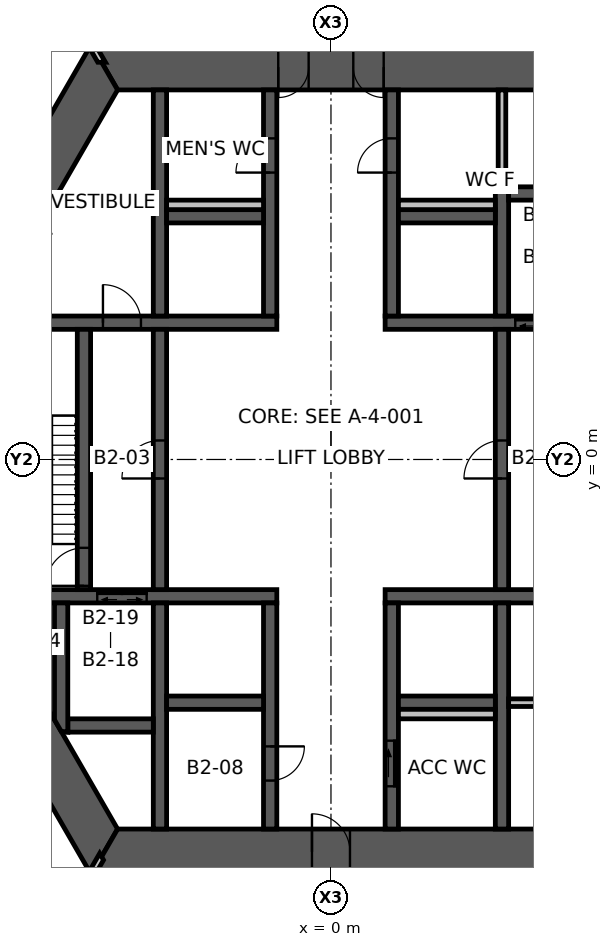
"""IFC4 building model, lengths in metres.
Left out: names, types, materials, properties, quantities, classifications, styles, units other than length and angle.
Written with IfcOpenShell. Run it as: python <this file> out.ifc"""

import sys

from ifc_helpers import new_model, si_unit, direction, frame, frame_2d, origin, place, context, subcontext, project, spatial, polyline, rectangle, outline, extrude, element, fill, save


model = new_model("IFC4")
c1 = context("Model", 3, precision=1e-05, world=origin(), true_north=direction((0.0, 1.0)))
c2 = subcontext(c1, "Body", "Model", "MODEL_VIEW")
j1 = project(units=[si_unit("LENGTHUNIT", "METRE"), si_unit("PLANEANGLEUNIT", "RADIAN")], contexts=[c1])
p1 = place(None, origin())
s1 = spatial("IfcSite", under=j1, at=p1, CompositionType="ELEMENT")
p2 = place(p1, origin())
s2 = spatial("IfcBuilding", under=s1, at=p2, CompositionType="ELEMENT")
p3 = place(p2, frame((0.0, 0.0, -10.0)))
s3 = spatial("IfcBuildingStorey", under=s2, at=p3, CompositionType="ELEMENT", Elevation=-10.0)
p4 = place(p3, frame((5.961, 10.325, 0.0), z_axis=(0.0, 0.0, 1.0), x_axis=(-1.0, 0.0, 0.0)))
e1 = element("IfcWall", 1, at=p4, inside=s3, PredefinedType="SHEAR", context=c2, shape_type="SweptSolid", body=[
    extrude(outline(polyline([(-0.346, -0.6), (4.574, -0.6), (5.374, -0.6), (6.549, -0.6), (7.349, -0.6), (12.269, -0.6), (11.576, 0.6), (7.349, 0.6), (6.549, 0.6), (5.374, 0.6), (4.574, 0.6), (0.346, 0.6), (-0.346, -0.6)])), origin(), (0.0, 0.0, 1.0), 5.0),
])
p5 = place(p4, frame((6.549, 0.0, 0.0)))
e2 = element("IfcOpeningElement", 2, at=p5, cuts=e1, PredefinedType="OPENING", context=c2, shape_type="SweptSolid", body=[
    extrude(rectangle(XDim=0.8, YDim=2.1, at=frame_2d((0.4, 1.05))), frame((0.0, 0.61, 0.0), z_axis=(0.0, -1.0, 0.0), x_axis=(1.0, 0.0, 0.0)), (0.0, 0.0, 1.0), 1.22),
])
p6 = place(p4, frame((4.574, 0.0, 0.0)))
e3 = element("IfcOpeningElement", 3, at=p6, cuts=e1, PredefinedType="OPENING", context=c2, shape_type="SweptSolid", body=[
    extrude(rectangle(XDim=0.8, YDim=2.1, at=frame_2d((0.4, 1.05))), frame((0.0, 0.61, 0.0), z_axis=(0.0, -1.0, 0.0), x_axis=(1.0, 0.0, 0.0)), (0.0, 0.0, 1.0), 1.22),
])
p7 = place(p3, frame((-5.961, 10.325, 0.0), z_axis=(0.0, 0.0, 1.0), x_axis=(-0.500004296715, -0.866022923061, 0.0)))
e4 = element("IfcWall", 4, at=p7, inside=s3, PredefinedType="SHEAR", context=c2, shape_type="SweptSolid", body=[
    extrude(outline(polyline([(-0.346, -0.6), (4.494, -0.6), (5.494, -0.6), (12.269, -0.6), (11.576, 0.6), (5.494, 0.6), (4.494, 0.6), (0.346, 0.6), (-0.346, -0.6)])), origin(), (0.0, 0.0, 1.0), 5.0),
])
p8 = place(p7, frame((4.494, 0.0, 0.0)))
e5 = element("IfcOpeningElement", 5, at=p8, cuts=e4, PredefinedType="OPENING", context=c2, shape_type="SweptSolid", body=[
    extrude(rectangle(XDim=1.0, YDim=2.1, at=frame_2d((0.5, 1.05))), frame((0.0, 0.61, 0.0), z_axis=(0.0, -1.0, 0.0), x_axis=(1.0, 0.0, 0.0)), (0.0, 0.0, 1.0), 1.22),
])
p9 = place(p3, frame((-11.922, 0.0, 0.0), z_axis=(0.0, 0.0, 1.0), x_axis=(0.500004296715, -0.866022923061, 0.0)))
e6 = element("IfcWall", 6, at=p9, inside=s3, PredefinedType="SHEAR", context=c2, shape_type="SweptSolid", body=[
    extrude(outline(polyline([(-0.346, -0.6), (6.581, -0.6), (7.381, -0.6), (12.269, -0.6), (11.576, 0.6), (7.381, 0.6), (6.581, 0.6), (0.346, 0.6), (-0.346, -0.6)])), origin(), (0.0, 0.0, 1.0), 5.0),
])
p10 = place(p9, frame((6.581, 0.0, 0.0)))
e7 = element("IfcOpeningElement", 7, at=p10, cuts=e6, PredefinedType="OPENING", context=c2, shape_type="SweptSolid", body=[
    extrude(rectangle(XDim=0.8, YDim=2.1, at=frame_2d((0.4, 1.05))), frame((0.0, 0.61, 0.0), z_axis=(0.0, -1.0, 0.0), x_axis=(1.0, 0.0, 0.0)), (0.0, 0.0, 1.0), 1.22),
])
p11 = place(p3, frame((-5.961, -10.325, 0.0), z_axis=(0.0, 0.0, 1.0), x_axis=(1.0, 0.0, 0.0)))
e8 = element("IfcWall", 8, at=p11, inside=s3, PredefinedType="SHEAR", context=c2, shape_type="SweptSolid", body=[
    extrude(outline(polyline([(-0.346, -0.6), (5.461, -0.6), (6.461, -0.6), (12.269, -0.6), (11.576, 0.6), (6.461, 0.6), (5.461, 0.6), (0.346, 0.6), (-0.346, -0.6)])), origin(), (0.0, 0.0, 1.0), 5.0),
])
p12 = place(p11, frame((5.461, 0.0, 0.0)))
e9 = element("IfcOpeningElement", 9, at=p12, cuts=e8, PredefinedType="OPENING", context=c2, shape_type="SweptSolid", body=[
    extrude(rectangle(XDim=1.0, YDim=2.1, at=frame_2d((0.5, 1.05))), frame((0.0, 0.61, 0.0), z_axis=(0.0, -1.0, 0.0), x_axis=(1.0, 0.0, 0.0)), (0.0, 0.0, 1.0), 1.22),
])
p13 = place(p3, frame((-9.151, 3.6, 0.0), z_axis=(0.0, 0.0, 1.0), x_axis=(1.0, 0.0, 0.0)))
e10 = element("IfcWall", 10, at=p13, inside=s3, PredefinedType="SHEAR", context=c2, shape_type="SweptSolid", body=[
    extrude(outline(polyline([(-0.101, -0.175), (3.151, -0.175), (4.151, -0.175), (7.726, -0.175), (7.726, 0.175), (4.151, 0.175), (3.151, 0.175), (0.101, 0.175), (-0.101, -0.175)])), origin(), (0.0, 0.0, 1.0), 5.0),
])
p14 = place(p13, frame((3.151, 0.0, 0.0)))
e11 = element("IfcOpeningElement", 11, at=p14, cuts=e10, PredefinedType="OPENING", context=c2, shape_type="SweptSolid", body=[
    extrude(rectangle(XDim=1.0, YDim=2.1, at=frame_2d((0.5, 1.05))), frame((0.0, 0.185, 0.0), z_axis=(0.0, -1.0, 0.0), x_axis=(1.0, 0.0, 0.0)), (0.0, 0.0, 1.0), 0.37),
])
p15 = place(p3, frame((1.425, 3.6, 0.0), z_axis=(0.0, 0.0, 1.0), x_axis=(1.0, 0.0, 0.0)))
e12 = element("IfcWall", 12, at=p15, inside=s3, PredefinedType="SHEAR", context=c2, shape_type="SweptSolid", body=[
    extrude(outline(polyline([(0.0, -0.175), (3.425, -0.175), (4.725, -0.175), (7.827, -0.175), (7.625, 0.175), (4.725, 0.175), (3.425, 0.175), (0.0, 0.175), (0.0, -0.175)])), origin(), (0.0, 0.0, 1.0), 5.0),
])
p16 = place(p15, frame((3.425, 0.0, 0.0)))
e13 = element("IfcOpeningElement", 13, at=p16, cuts=e12, PredefinedType="OPENING", context=c2, shape_type="SweptSolid", body=[
    extrude(rectangle(XDim=1.3, YDim=2.1, at=frame_2d((0.65, 1.05))), frame((0.0, 0.185, 0.0), z_axis=(0.0, -1.0, 0.0), x_axis=(1.0, 0.0, 0.0)), (0.0, 0.0, 1.0), 0.37),
])
p17 = place(p3, frame((-9.151, -3.6, 0.0), z_axis=(0.0, 0.0, 1.0), x_axis=(1.0, 0.0, 0.0)))
e14 = element("IfcWall", 14, at=p17, inside=s3, PredefinedType="SHEAR", context=c2, shape_type="SweptSolid", body=[
    extrude(outline(polyline([(0.101, -0.175), (3.001, -0.175), (4.301, -0.175), (7.726, -0.175), (7.726, 0.175), (4.301, 0.175), (3.001, 0.175), (-0.101, 0.175), (0.101, -0.175)])), origin(), (0.0, 0.0, 1.0), 5.0),
])
p18 = place(p17, frame((3.001, 0.0, 0.0)))
e15 = element("IfcOpeningElement", 15, at=p18, cuts=e14, PredefinedType="OPENING", context=c2, shape_type="SweptSolid", body=[
    extrude(rectangle(XDim=1.3, YDim=2.1, at=frame_2d((0.65, 1.05))), frame((0.0, 0.185, 0.0), z_axis=(0.0, -1.0, 0.0), x_axis=(1.0, 0.0, 0.0)), (0.0, 0.0, 1.0), 0.37),
])
p19 = place(p3, frame((1.425, -3.6, 0.0), z_axis=(0.0, 0.0, 1.0), x_axis=(1.0, 0.0, 0.0)))
e16 = element("IfcWall", 16, at=p19, inside=s3, PredefinedType="SHEAR", context=c2, shape_type="SweptSolid", body=[
    extrude(outline(polyline([(0.0, -0.175), (7.625, -0.175), (7.827, 0.175), (0.0, 0.175), (0.0, -0.175)])), origin(), (0.0, 0.0, 1.0), 5.0),
])
p20 = place(p3, frame((-1.6, 3.775, 0.0), z_axis=(0.0, 0.0, 1.0), x_axis=(0.0, 1.0, 0.0)))
e17 = element("IfcWall", 17, at=p20, inside=s3, PredefinedType="SHEAR", context=c2, shape_type="SweptSolid", body=[
    extrude(rectangle(XDim=5.95, YDim=0.35, at=frame_2d((2.975, 0.0))), origin(), (0.0, 0.0, 1.0), 5.0),
])
p21 = place(p20, frame((3.775, 0.0, 0.0)))
e18 = element("IfcOpeningElement", 18, at=p21, cuts=e17, PredefinedType="OPENING", context=c2, shape_type="SweptSolid", body=[
    extrude(rectangle(XDim=0.9, YDim=2.1, at=frame_2d((0.45, 1.05))), frame((0.0, 0.185, 0.0), z_axis=(0.0, -1.0, 0.0), x_axis=(1.0, 0.0, 0.0)), (0.0, 0.0, 1.0), 0.37),
])
p22 = place(p3, frame((1.6, 3.775, 0.0), z_axis=(0.0, 0.0, 1.0), x_axis=(0.0, 1.0, 0.0)))
e19 = element("IfcWall", 19, at=p22, inside=s3, PredefinedType="SHEAR", context=c2, shape_type="SweptSolid", body=[
    extrude(rectangle(XDim=5.95, YDim=0.35, at=frame_2d((2.975, 0.0))), origin(), (0.0, 0.0, 1.0), 5.0),
])
p23 = place(p22, frame((3.775, 0.0, 0.0)))
e20 = element("IfcOpeningElement", 20, at=p23, cuts=e19, PredefinedType="OPENING", context=c2, shape_type="SweptSolid", body=[
    extrude(rectangle(XDim=0.9, YDim=2.1, at=frame_2d((0.45, 1.05))), frame((0.0, 0.185, 0.0), z_axis=(0.0, -1.0, 0.0), x_axis=(1.0, 0.0, 0.0)), (0.0, 0.0, 1.0), 0.37),
])
p24 = place(p3, frame((-1.6, -3.775, 0.0), z_axis=(0.0, 0.0, 1.0), x_axis=(0.0, -1.0, 0.0)))
e21 = element("IfcWall", 21, at=p24, inside=s3, PredefinedType="SHEAR", context=c2, shape_type="SweptSolid", body=[
    extrude(rectangle(XDim=5.95, YDim=0.35, at=frame_2d((2.975, 0.0))), origin(), (0.0, 0.0, 1.0), 5.0),
])
p25 = place(p24, frame((3.775, 0.0, 0.0)))
e22 = element("IfcOpeningElement", 22, at=p25, cuts=e21, PredefinedType="OPENING", context=c2, shape_type="SweptSolid", body=[
    extrude(rectangle(XDim=0.9, YDim=2.1, at=frame_2d((0.45, 1.05))), frame((0.0, 0.185, 0.0), z_axis=(0.0, -1.0, 0.0), x_axis=(1.0, 0.0, 0.0)), (0.0, 0.0, 1.0), 0.37),
])
p26 = place(p3, frame((1.6, -3.775, 0.0), z_axis=(0.0, 0.0, 1.0), x_axis=(0.0, -1.0, 0.0)))
e23 = element("IfcWall", 23, at=p26, inside=s3, PredefinedType="SHEAR", context=c2, shape_type="SweptSolid", body=[
    extrude(rectangle(XDim=5.95, YDim=0.35, at=frame_2d((2.975, 0.0))), origin(), (0.0, 0.0, 1.0), 5.0),
])
p27 = place(p26, frame((3.625, 0.0, 0.0)))
e24 = element("IfcOpeningElement", 24, at=p27, cuts=e23, PredefinedType="OPENING", context=c2, shape_type="SweptSolid", body=[
    extrude(rectangle(XDim=1.2, YDim=2.1, at=frame_2d((0.6, 1.05))), frame((0.0, 0.185, 0.0), z_axis=(0.0, -1.0, 0.0), x_axis=(1.0, 0.0, 0.0)), (0.0, 0.0, 1.0), 0.37),
])
p28 = place(p3, frame((-4.5, -3.425, 0.0), z_axis=(0.0, 0.0, 1.0), x_axis=(0.0, 1.0, 0.0)))
e25 = element("IfcWall", 25, at=p28, inside=s3, PredefinedType="SHEAR", context=c2, shape_type="SweptSolid", body=[
    extrude(rectangle(XDim=6.85, YDim=0.35, at=frame_2d((3.425, 0.0))), origin(), (0.0, 0.0, 1.0), 5.0),
])
p29 = place(p28, frame((2.925, 0.0, 0.0)))
e26 = element("IfcOpeningElement", 26, at=p29, cuts=e25, PredefinedType="OPENING", context=c2, shape_type="SweptSolid", body=[
    extrude(rectangle(XDim=1.0, YDim=2.1, at=frame_2d((0.5, 1.05))), frame((0.0, 0.185, 0.0), z_axis=(0.0, -1.0, 0.0), x_axis=(1.0, 0.0, 0.0)), (0.0, 0.0, 1.0), 0.37),
])
p30 = place(p3, frame((4.5, -3.425, 0.0), z_axis=(0.0, 0.0, 1.0), x_axis=(0.0, 1.0, 0.0)))
e27 = element("IfcWall", 27, at=p30, inside=s3, PredefinedType="SHEAR", context=c2, shape_type="SweptSolid", body=[
    extrude(rectangle(XDim=6.85, YDim=0.35, at=frame_2d((3.425, 0.0))), origin(), (0.0, 0.0, 1.0), 5.0),
])
p31 = place(p30, frame((2.925, 0.0, 0.0)))
e28 = element("IfcOpeningElement", 28, at=p31, cuts=e27, PredefinedType="OPENING", context=c2, shape_type="SweptSolid", body=[
    extrude(rectangle(XDim=1.0, YDim=2.1, at=frame_2d((0.5, 1.05))), frame((0.0, 0.185, 0.0), z_axis=(0.0, -1.0, 0.0), x_axis=(1.0, 0.0, 0.0)), (0.0, 0.0, 1.0), 0.37),
])
p32 = place(p3, frame((-6.5, -3.425, 0.0), z_axis=(0.0, 0.0, 1.0), x_axis=(0.0, 1.0, 0.0)))
e29 = element("IfcWall", 29, at=p32, inside=s3, PredefinedType="SHEAR", context=c2, shape_type="SweptSolid", body=[
    extrude(rectangle(XDim=6.85, YDim=0.35, at=frame_2d((3.425, 0.0))), origin(), (0.0, 0.0, 1.0), 5.0),
])
p33 = place(p32, frame((0.1, 0.0, 0.0)))
e30 = element("IfcOpeningElement", 30, at=p33, cuts=e29, PredefinedType="OPENING", context=c2, shape_type="SweptSolid", body=[
    extrude(rectangle(XDim=1.0, YDim=2.1, at=frame_2d((0.5, 1.05))), frame((0.0, 0.185, 0.0), z_axis=(0.0, -1.0, 0.0), x_axis=(1.0, 0.0, 0.0)), (0.0, 0.0, 1.0), 0.37),
])
p34 = place(p3, frame((-4.5, 3.775, 0.0), z_axis=(0.0, 0.0, 1.0), x_axis=(0.0, 1.0, 0.0)))
e31 = element("IfcWall", 31, at=p34, inside=s3, PredefinedType="SHEAR", context=c2, shape_type="SweptSolid", body=[
    extrude(rectangle(XDim=5.95, YDim=0.35, at=frame_2d((2.975, 0.0))), origin(), (0.0, 0.0, 1.0), 5.0),
])
p35 = place(p3, frame((4.5, 3.775, 0.0), z_axis=(0.0, 0.0, 1.0), x_axis=(0.0, 1.0, 0.0)))
e32 = element("IfcWall", 32, at=p35, inside=s3, PredefinedType="SHEAR", context=c2, shape_type="SweptSolid", body=[
    extrude(rectangle(XDim=3.4, YDim=0.35, at=frame_2d((1.7, 0.0))), origin(), (0.0, 0.0, 1.0), 5.0),
])
for number, where, z_axis, x_axis in (
    (33, (-4.5, -3.775, 0.0), (0.0, 0.0, 1.0), (0.0, -1.0, 0.0)),
    (34, (4.5, -3.775, 0.0), (0.0, 0.0, 1.0), (0.0, -1.0, 0.0)),
):
    element("IfcWall", number, at=place(p3, frame(where, z_axis=z_axis, x_axis=x_axis)), inside=s3, PredefinedType="SHEAR", context=c2, shape_type="SweptSolid", body=[
        extrude(rectangle(XDim=5.95, YDim=0.35, at=frame_2d((2.975, 0.0))), origin(), (0.0, 0.0, 1.0), 5.0),
    ])
for number, where, z_axis, x_axis in (
    (35, (-4.325, 6.4, 0.0), (0.0, 0.0, 1.0), (1.0, 0.0, 0.0)),
    (36, (1.775, 6.4, 0.0), (0.0, 0.0, 1.0), (1.0, 0.0, 0.0)),
    (37, (-4.325, -6.4, 0.0), (0.0, 0.0, 1.0), (1.0, 0.0, 0.0)),
    (38, (1.775, -6.4, 0.0), (0.0, 0.0, 1.0), (1.0, 0.0, 0.0)),
):
    element("IfcWall", number, at=place(p3, frame(where, z_axis=z_axis, x_axis=x_axis)), inside=s3, PredefinedType="SHEAR", context=c2, shape_type="SweptSolid", body=[
        extrude(rectangle(XDim=2.55, YDim=0.35, at=frame_2d((1.275, 0.0))), origin(), (0.0, 0.0, 1.0), 5.0),
    ])
p36 = place(p3, frame((-6.925, -7.0, 0.0), z_axis=(0.0, 0.0, 1.0), x_axis=(1.0, 0.0, 0.0)))
e39 = element("IfcWall", 39, at=p36, inside=s3, PredefinedType="SHEAR", context=c2, shape_type="SweptSolid", body=[
    extrude(rectangle(XDim=2.25, YDim=0.35, at=frame_2d((1.125, 0.0))), origin(), (0.0, 0.0, 1.0), 5.0),
])
p37 = place(p3, frame((-7.1, -3.775, 0.0), z_axis=(0.0, 0.0, 1.0), x_axis=(0.0, -1.0, 0.0)))
e40 = element("IfcWall", 40, at=p37, inside=s3, PredefinedType="SHEAR", context=c2, shape_type="SweptSolid", body=[
    extrude(outline(polyline([(0.0, -0.175), (3.074, -0.175), (3.377, 0.0), (3.4, 0.175), (0.0, 0.175), (0.0, -0.175)])), origin(), (0.0, 0.0, 1.0), 5.0),
])
p38 = place(p3, frame((4.675, 7.0, 0.0), z_axis=(0.0, 0.0, 1.0), x_axis=(1.0, 0.0, 0.0)))
e41 = element("IfcWall", 41, at=p38, inside=s3, PredefinedType="SHEAR", context=c2, shape_type="SweptSolid", body=[
    extrude(rectangle(XDim=2.25, YDim=0.35, at=frame_2d((1.125, 0.0))), origin(), (0.0, 0.0, 1.0), 5.0),
])
p39 = place(p3, frame((4.5, 7.175, 0.0), z_axis=(0.0, 0.0, 1.0), x_axis=(0.0, 1.0, 0.0)))
e42 = element("IfcWall", 42, at=p39, inside=s3, PredefinedType="STANDARD", context=c2, shape_type="SweptSolid", body=[
    extrude(rectangle(XDim=2.55, YDim=0.2, at=frame_2d((1.275, 0.0))), origin(), (0.0, 0.0, 1.0), 5.0),
])
p40 = place(p3, frame((4.675, -6.4, 0.0), z_axis=(0.0, 0.0, 1.0), x_axis=(1.0, 0.0, 0.0)))
e43 = element("IfcWall", 43, at=p40, inside=s3, PredefinedType="STANDARD", context=c2, shape_type="SweptSolid", body=[
    extrude(rectangle(XDim=2.425, YDim=0.2, at=frame_2d((1.212, 0.0))), origin(), (0.0, 0.0, 1.0), 5.0),
])
for number, where, z_axis, x_axis in (
    (44, (-4.325, 6.7, 0.0), (0.0, 0.0, 1.0), (1.0, 0.0, 0.0)),
    (45, (1.775, 6.7, 0.0), (0.0, 0.0, 1.0), (1.0, 0.0, 0.0)),
    (46, (1.775, -6.7, 0.0), (0.0, 0.0, 1.0), (1.0, 0.0, 0.0)),
):
    element("IfcWall", number, at=place(p3, frame(where, z_axis=z_axis, x_axis=x_axis)), inside=s3, PredefinedType="PLUMBINGWALL", context=c2, shape_type="SweptSolid", body=[
        extrude(rectangle(XDim=2.55, YDim=0.25, at=frame_2d((1.275, 0.0))), origin(), (0.0, 0.0, 1.0), 5.0),
    ])
p41 = place(p3, frame((-6.035, 10.453, 0.0), z_axis=(0.0, 0.0, 1.0), x_axis=(-0.499993402427, 0.866029212861, 0.0)))
e47 = element("IfcWall", 47, at=p41, inside=s3, PredefinedType="PARTITIONING", context=c2, shape_type="SweptSolid", body=[
    extrude(outline(polyline([(-0.051, -0.087), (1.129, -0.087), (2.129, -0.087), (7.93, -0.087), (7.93, 0.087), (2.129, 0.087), (1.129, 0.087), (0.051, 0.087), (-0.051, -0.087)])), origin(), (0.0, 0.0, 1.0), 3.85),
])
p42 = place(p41, frame((1.129, 0.0, 0.0)))
e48 = element("IfcOpeningElement", 48, at=p42, cuts=e47, PredefinedType="OPENING", context=c2, shape_type="SweptSolid", body=[
    extrude(rectangle(XDim=1.0, YDim=2.1, at=frame_2d((0.5, 1.05))), frame((0.0, 0.098, 0.0), z_axis=(0.0, -1.0, 0.0), x_axis=(1.0, 0.0, 0.0)), (0.0, 0.0, 1.0), 0.195),
])
p43 = place(p3, frame((-6.035, -10.453, 0.0), z_axis=(0.0, 0.0, 1.0), x_axis=(-0.499993402427, -0.866029212861, 0.0)))
e49 = element("IfcWall", 49, at=p43, inside=s3, PredefinedType="PARTITIONING", context=c2, shape_type="SweptSolid", body=[
    extrude(outline(polyline([(-0.051, -0.087), (1.129, -0.087), (2.129, -0.087), (7.93, -0.087), (7.93, 0.087), (2.129, 0.087), (1.129, 0.087), (0.051, 0.087), (-0.051, -0.087)])), origin(), (0.0, 0.0, 1.0), 3.85),
])
p44 = place(p43, frame((1.129, 0.0, 0.0)))
e50 = element("IfcOpeningElement", 50, at=p44, cuts=e49, PredefinedType="OPENING", context=c2, shape_type="SweptSolid", body=[
    extrude(rectangle(XDim=1.0, YDim=2.1, at=frame_2d((0.5, 1.05))), frame((0.0, 0.098, 0.0), z_axis=(0.0, -1.0, 0.0), x_axis=(1.0, 0.0, 0.0)), (0.0, 0.0, 1.0), 0.195),
])
p45 = place(p5, origin())
e51 = element("IfcDoor", 51, at=p45, inside=s3, OperationType="SINGLE_SWING_RIGHT", PredefinedType="DOOR", context=c2, shape_type="SweptSolid", body=[
    extrude(rectangle(XDim=0.8, YDim=2.1, at=frame_2d((0.4, 1.05))), frame((0.0, 0.025, 0.0), z_axis=(0.0, -1.0, 0.0), x_axis=(1.0, 0.0, 0.0)), (0.0, 0.0, 1.0), 0.05),
])
fill(e2, e51)
p46 = place(p6, origin())
e52 = element("IfcDoor", 52, at=p46, inside=s3, OperationType="SINGLE_SWING_LEFT", PredefinedType="DOOR", context=c2, shape_type="SweptSolid", body=[
    extrude(rectangle(XDim=0.8, YDim=2.1, at=frame_2d((0.4, 1.05))), frame((0.0, 0.025, 0.0), z_axis=(0.0, -1.0, 0.0), x_axis=(1.0, 0.0, 0.0)), (0.0, 0.0, 1.0), 0.05),
])
fill(e3, e52)
p47 = place(p12, origin())
e53 = element("IfcDoor", 53, at=p47, inside=s3, OperationType="SINGLE_SWING_LEFT", PredefinedType="DOOR", context=c2, shape_type="SweptSolid", body=[
    extrude(rectangle(XDim=1.0, YDim=2.1, at=frame_2d((0.5, 1.05))), frame((0.0, 0.025, 0.0), z_axis=(0.0, -1.0, 0.0), x_axis=(1.0, 0.0, 0.0)), (0.0, 0.0, 1.0), 0.05),
])
fill(e9, e53)
p48 = place(p31, origin())
e54 = element("IfcDoor", 54, at=p48, inside=s3, OperationType="SINGLE_SWING_LEFT", PredefinedType="DOOR", context=c2, shape_type="SweptSolid", body=[
    extrude(rectangle(XDim=1.0, YDim=2.1, at=frame_2d((0.5, 1.05))), frame((0.0, 0.025, 0.0), z_axis=(0.0, -1.0, 0.0), x_axis=(1.0, 0.0, 0.0)), (0.0, 0.0, 1.0), 0.05),
])
fill(e28, e54)
p49 = place(p29, origin())
e55 = element("IfcDoor", 55, at=p49, inside=s3, OperationType="SINGLE_SWING_LEFT", PredefinedType="DOOR", context=c2, shape_type="SweptSolid", body=[
    extrude(rectangle(XDim=1.0, YDim=2.1, at=frame_2d((0.5, 1.05))), frame((0.0, 0.025, 0.0), z_axis=(0.0, -1.0, 0.0), x_axis=(1.0, 0.0, 0.0)), (0.0, 0.0, 1.0), 0.05),
])
fill(e26, e55)
p50 = place(p33, origin())
e56 = element("IfcDoor", 56, at=p50, inside=s3, OperationType="SINGLE_SWING_LEFT", PredefinedType="DOOR", context=c2, shape_type="SweptSolid", body=[
    extrude(rectangle(XDim=1.0, YDim=2.1, at=frame_2d((0.5, 1.05))), frame((0.0, 0.025, 0.0), z_axis=(0.0, -1.0, 0.0), x_axis=(1.0, 0.0, 0.0)), (0.0, 0.0, 1.0), 0.05),
])
fill(e30, e56)
p51 = place(p14, origin())
e57 = element("IfcDoor", 57, at=p51, inside=s3, OperationType="SINGLE_SWING_LEFT", PredefinedType="DOOR", context=c2, shape_type="SweptSolid", body=[
    extrude(rectangle(XDim=1.0, YDim=2.1, at=frame_2d((0.5, 1.05))), frame((0.0, 0.025, 0.0), z_axis=(0.0, -1.0, 0.0), x_axis=(1.0, 0.0, 0.0)), (0.0, 0.0, 1.0), 0.05),
])
fill(e11, e57)
p52 = place(p21, origin())
e58 = element("IfcDoor", 58, at=p52, inside=s3, OperationType="SINGLE_SWING_LEFT", PredefinedType="DOOR", context=c2, shape_type="SweptSolid", body=[
    extrude(rectangle(XDim=0.9, YDim=2.1, at=frame_2d((0.45, 1.05))), frame((0.0, 0.025, 0.0), z_axis=(0.0, -1.0, 0.0), x_axis=(1.0, 0.0, 0.0)), (0.0, 0.0, 1.0), 0.05),
])
fill(e18, e58)
p53 = place(p23, origin())
e59 = element("IfcDoor", 59, at=p53, inside=s3, OperationType="SINGLE_SWING_LEFT", PredefinedType="DOOR", context=c2, shape_type="SweptSolid", body=[
    extrude(rectangle(XDim=0.9, YDim=2.1, at=frame_2d((0.45, 1.05))), frame((0.0, 0.025, 0.0), z_axis=(0.0, -1.0, 0.0), x_axis=(1.0, 0.0, 0.0)), (0.0, 0.0, 1.0), 0.05),
])
fill(e20, e59)
p54 = place(p27, origin())
e60 = element("IfcDoor", 60, at=p54, inside=s3, OperationType="SLIDING_TO_LEFT", PredefinedType="DOOR", context=c2, shape_type="SweptSolid", body=[
    extrude(rectangle(XDim=1.2, YDim=2.1, at=frame_2d((0.6, 1.05))), frame((0.0, 0.025, 0.0), z_axis=(0.0, -1.0, 0.0), x_axis=(1.0, 0.0, 0.0)), (0.0, 0.0, 1.0), 0.05),
])
fill(e24, e60)
p55 = place(p25, origin())
e61 = element("IfcDoor", 61, at=p55, inside=s3, OperationType="SINGLE_SWING_LEFT", PredefinedType="DOOR", context=c2, shape_type="SweptSolid", body=[
    extrude(rectangle(XDim=0.9, YDim=2.1, at=frame_2d((0.45, 1.05))), frame((0.0, 0.025, 0.0), z_axis=(0.0, -1.0, 0.0), x_axis=(1.0, 0.0, 0.0)), (0.0, 0.0, 1.0), 0.05),
])
fill(e22, e61)
p56 = place(p16, origin())
e62 = element("IfcDoor", 62, at=p56, inside=s3, OperationType="DOUBLE_DOOR_SLIDING", PredefinedType="DOOR", context=c2, shape_type="SweptSolid", body=[
    extrude(rectangle(XDim=1.3, YDim=2.1, at=frame_2d((0.65, 1.05))), frame((0.0, 0.025, 0.0), z_axis=(0.0, -1.0, 0.0), x_axis=(1.0, 0.0, 0.0)), (0.0, 0.0, 1.0), 0.05),
])
fill(e13, e62)
p57 = place(p18, origin())
e63 = element("IfcDoor", 63, at=p57, inside=s3, OperationType="DOUBLE_DOOR_SLIDING", PredefinedType="DOOR", context=c2, shape_type="SweptSolid", body=[
    extrude(rectangle(XDim=1.3, YDim=2.1, at=frame_2d((0.65, 1.05))), frame((0.0, 0.025, 0.0), z_axis=(0.0, -1.0, 0.0), x_axis=(1.0, 0.0, 0.0)), (0.0, 0.0, 1.0), 0.05),
])
fill(e15, e63)
save(model, sys.argv[1])
